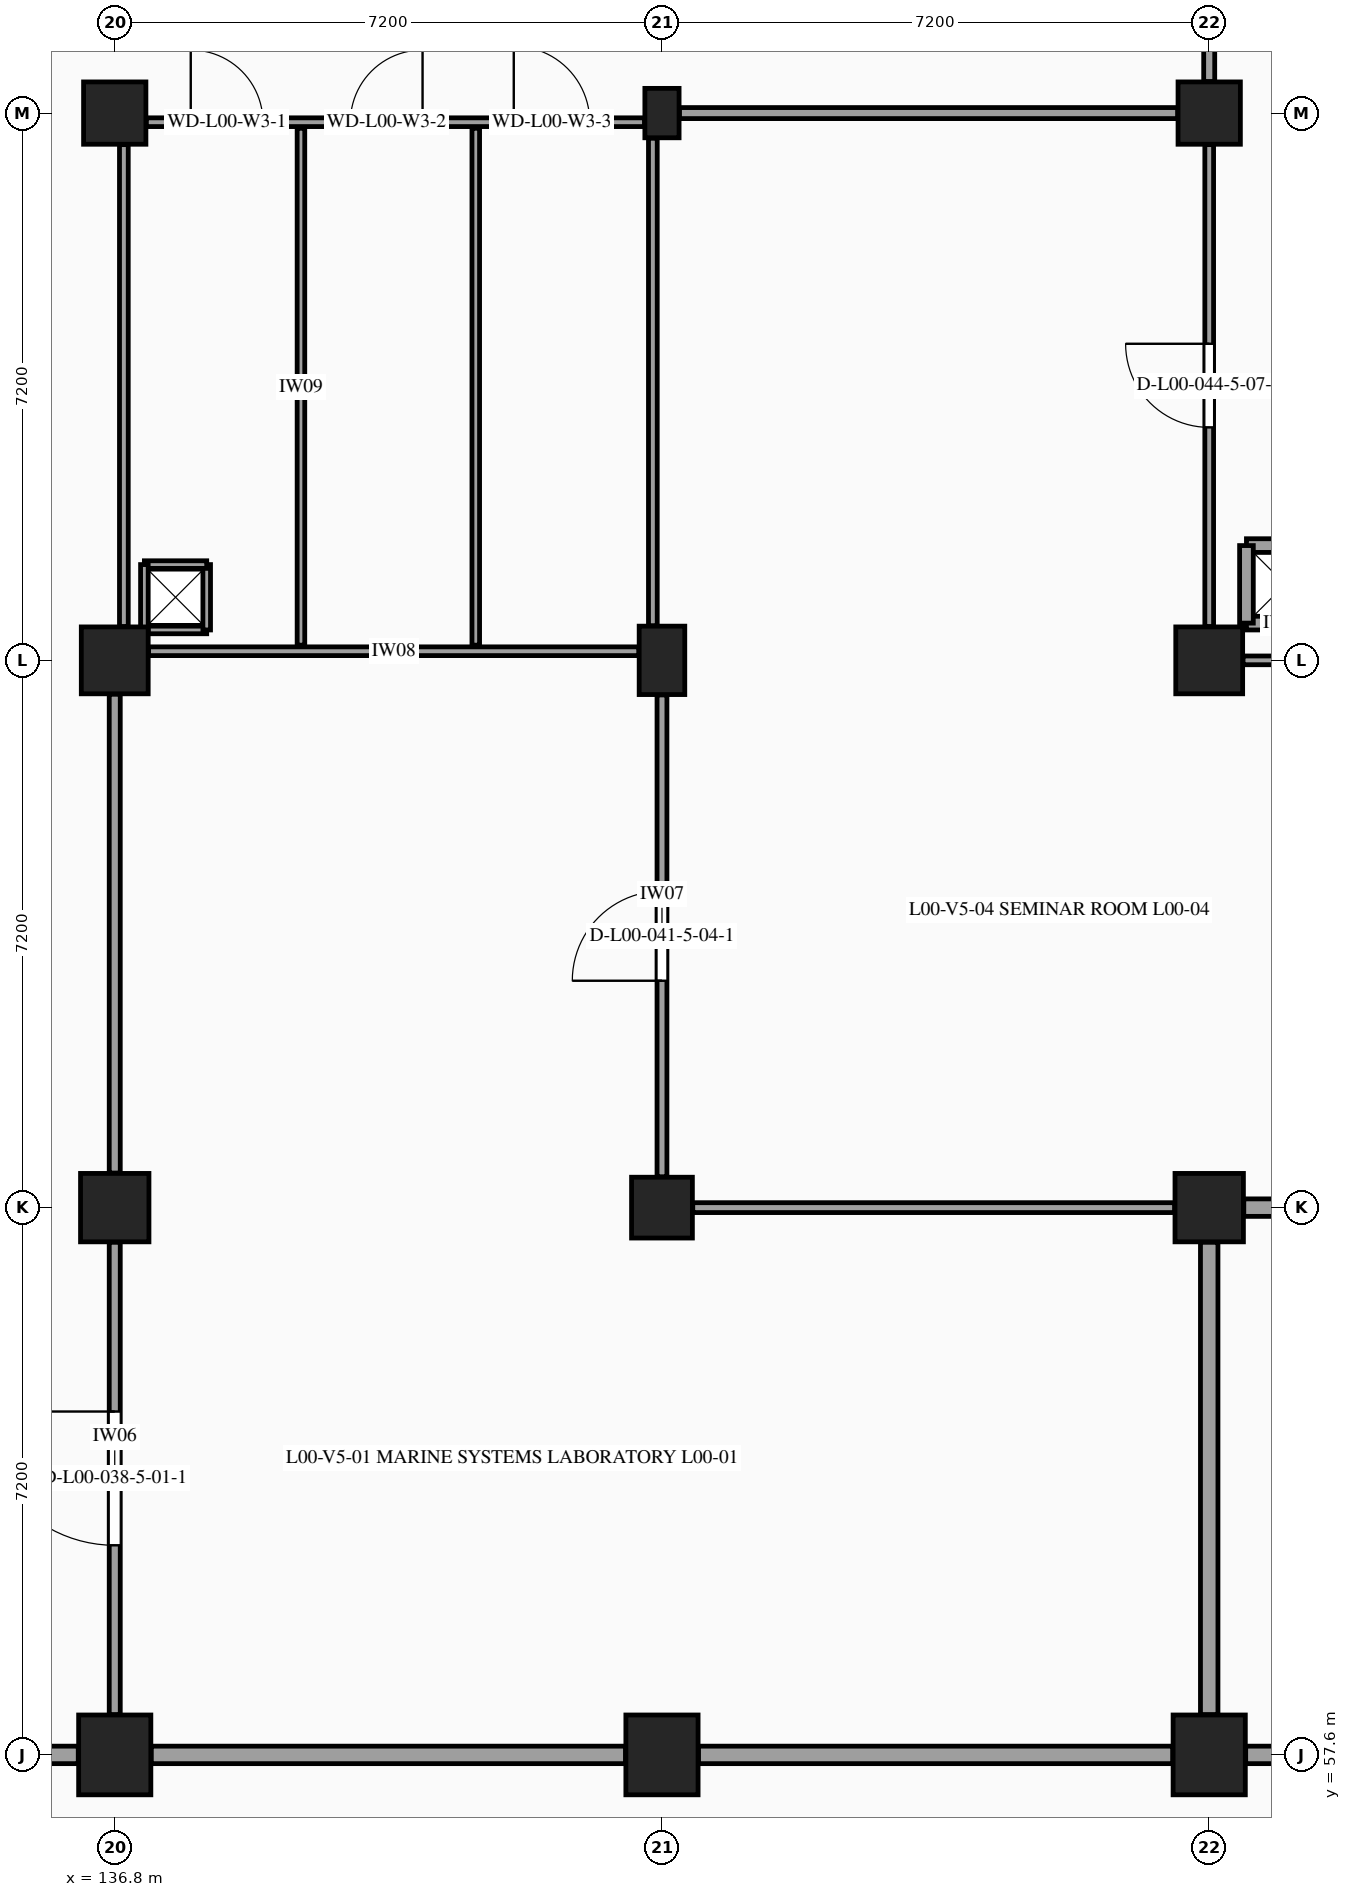
"""IFC4 building model, lengths in metres.
Left out: names, types, materials, properties, quantities, classifications, styles, units other than length and angle.
Written with IfcOpenShell. Run it as: python <this file> out.ifc"""

import sys

from ifc_helpers import new_model, si_unit, direction, frame, frame_2d, origin, origin_2d, place, context, subcontext, project, spatial, rectangle, extrude, element, fill, save


model = new_model("IFC4")
c1 = context("Model", 3, precision=1e-05, world=origin(), true_north=direction((0.0, 1.0)))
c2 = subcontext(c1, "Body", "Model", "MODEL_VIEW")
j1 = project(units=[si_unit("LENGTHUNIT", "METRE"), si_unit("PLANEANGLEUNIT", "RADIAN")], contexts=[c1])
p1 = place(None, origin())
s1 = spatial("IfcSite", under=j1, at=p1, CompositionType="ELEMENT")
p2 = place(p1, origin())
s2 = spatial("IfcBuilding", under=s1, at=p2, CompositionType="ELEMENT")
p3 = place(p2, origin())
s3 = spatial("IfcBuildingStorey", under=s2, at=p3, CompositionType="ELEMENT", Elevation=0.0)
p4 = place(p3, frame((136.8, 57.6, 0.0), z_axis=(0.0, 0.0, 1.0), x_axis=(1.0, 0.0, 0.0)))
e1 = element("IfcColumn", 1, at=p4, inside=s3, PredefinedType="COLUMN", context=c2, shape_type="SweptSolid", body=[
    extrude(rectangle(XDim=0.95, YDim=1.05, at=origin_2d()), origin(), (0.0, 0.0, 1.0), 5.4),
])
p5 = place(p3, frame((136.8, 64.8, 0.0), z_axis=(0.0, 0.0, 1.0), x_axis=(1.0, 0.0, 0.0)))
e2 = element("IfcColumn", 2, at=p5, inside=s3, PredefinedType="COLUMN", context=c2, shape_type="SweptSolid", body=[
    extrude(rectangle(XDim=0.9, YDim=0.9, at=origin_2d()), origin(), (0.0, 0.0, 1.0), 5.4),
])
p6 = place(p3, frame((136.8, 72.0, 0.0), z_axis=(0.0, 0.0, 1.0), x_axis=(1.0, 0.0, 0.0)))
e3 = element("IfcColumn", 3, at=p6, inside=s3, PredefinedType="COLUMN", context=c2, shape_type="SweptSolid", body=[
    extrude(rectangle(XDim=0.88, YDim=0.88, at=origin_2d()), origin(), (0.0, 0.0, 1.0), 5.4),
])
p7 = place(p3, frame((136.8, 79.2, 0.0), z_axis=(0.0, 0.0, 1.0), x_axis=(1.0, 0.0, 0.0)))
e4 = element("IfcColumn", 4, at=p7, inside=s3, PredefinedType="COLUMN", context=c2, shape_type="SweptSolid", body=[
    extrude(rectangle(XDim=0.82, YDim=0.82, at=origin_2d()), origin(), (0.0, 0.0, 1.0), 5.4),
])
p8 = place(p3, frame((144.0, 57.6, 0.0), z_axis=(0.0, 0.0, 1.0), x_axis=(1.0, 0.0, 0.0)))
e5 = element("IfcColumn", 5, at=p8, inside=s3, PredefinedType="COLUMN", context=c2, shape_type="SweptSolid", body=[
    extrude(rectangle(XDim=0.95, YDim=1.05, at=origin_2d()), origin(), (0.0, 0.0, 1.0), 5.4),
])
p9 = place(p3, frame((144.0, 64.8, 0.0), z_axis=(0.0, 0.0, 1.0), x_axis=(1.0, 0.0, 0.0)))
e6 = element("IfcColumn", 6, at=p9, inside=s3, PredefinedType="COLUMN", context=c2, shape_type="SweptSolid", body=[
    extrude(rectangle(XDim=0.8, YDim=0.8, at=origin_2d()), origin(), (0.0, 0.0, 1.0), 5.4),
])
p10 = place(p3, frame((144.0, 72.0, 0.0), z_axis=(0.0, 0.0, 1.0), x_axis=(1.0, 0.0, 0.0)))
e7 = element("IfcColumn", 7, at=p10, inside=s3, PredefinedType="COLUMN", context=c2, shape_type="SweptSolid", body=[
    extrude(rectangle(XDim=0.6, YDim=0.9, at=origin_2d()), origin(), (0.0, 0.0, 1.0), 5.4),
])
p11 = place(p3, frame((144.0, 79.2, 0.0), z_axis=(0.0, 0.0, 1.0), x_axis=(1.0, 0.0, 0.0)))
e8 = element("IfcColumn", 8, at=p11, inside=s3, PredefinedType="PILASTER", context=c2, shape_type="SweptSolid", body=[
    extrude(rectangle(XDim=0.45, YDim=0.65, at=origin_2d()), origin(), (0.0, 0.0, 1.0), 5.4),
])
p12 = place(p3, frame((151.2, 57.6, 0.0), z_axis=(0.0, 0.0, 1.0), x_axis=(1.0, 0.0, 0.0)))
e9 = element("IfcColumn", 9, at=p12, inside=s3, PredefinedType="COLUMN", context=c2, shape_type="SweptSolid", body=[
    extrude(rectangle(XDim=0.95, YDim=1.05, at=origin_2d()), origin(), (0.0, 0.0, 1.0), 5.4),
])
p13 = place(p3, frame((151.2, 64.8, 0.0), z_axis=(0.0, 0.0, 1.0), x_axis=(1.0, 0.0, 0.0)))
e10 = element("IfcColumn", 10, at=p13, inside=s3, PredefinedType="COLUMN", context=c2, shape_type="SweptSolid", body=[
    extrude(rectangle(XDim=0.9, YDim=0.9, at=origin_2d()), origin(), (0.0, 0.0, 1.0), 5.4),
])
p14 = place(p3, frame((151.2, 72.0, 0.0), z_axis=(0.0, 0.0, 1.0), x_axis=(1.0, 0.0, 0.0)))
e11 = element("IfcColumn", 11, at=p14, inside=s3, PredefinedType="COLUMN", context=c2, shape_type="SweptSolid", body=[
    extrude(rectangle(XDim=0.88, YDim=0.88, at=origin_2d()), origin(), (0.0, 0.0, 1.0), 5.4),
])
p15 = place(p3, frame((151.2, 79.2, 0.0), z_axis=(0.0, 0.0, 1.0), x_axis=(1.0, 0.0, 0.0)))
e12 = element("IfcColumn", 12, at=p15, inside=s3, PredefinedType="COLUMN", context=c2, shape_type="SweptSolid", body=[
    extrude(rectangle(XDim=0.82, YDim=0.82, at=origin_2d()), origin(), (0.0, 0.0, 1.0), 5.4),
])
p16 = place(p3, frame((137.245, 72.12, 0.0), z_axis=(0.0, 0.0, 1.0), x_axis=(1.0, 0.0, 0.0)))
e13 = element("IfcWall", 13, at=p16, inside=s3, PredefinedType="PARTITIONING", context=c2, shape_type="SweptSolid", body=[
    extrude(rectangle(XDim=6.45, YDim=0.115, at=frame_2d((3.225, 0.0))), origin(), (0.0, 0.0, 1.0), 4.29),
])
p17 = place(p3, frame((137.215, 79.08, 0.0), z_axis=(0.0, 0.0, 1.0), x_axis=(1.0, 0.0, 0.0)))
e14 = element("IfcWall", 14, at=p17, inside=s3, PredefinedType="PARTITIONING", context=c2, shape_type="SweptSolid", body=[
    extrude(rectangle(XDim=6.555, YDim=0.115, at=frame_2d((3.277, 0.0))), origin(), (0.0, 0.0, 1.0), 4.29),
])
p18 = place(p17, frame((0.585, 0.0, 0.0)))
e15 = element("IfcOpeningElement", 15, at=p18, cuts=e14, PredefinedType="OPENING", context=c2, shape_type="SweptSolid", body=[
    extrude(rectangle(XDim=0.95, YDim=2.1, at=frame_2d((0.475, 1.05))), frame((0.0, 0.067, 0.0), z_axis=(0.0, -1.0, 0.0), x_axis=(1.0, 0.0, 0.0)), (0.0, 0.0, 1.0), 0.135),
])
p19 = place(p17, frame((2.685, 0.0, 0.0)))
e16 = element("IfcOpeningElement", 16, at=p19, cuts=e14, PredefinedType="OPENING", context=c2, shape_type="SweptSolid", body=[
    extrude(rectangle(XDim=0.95, YDim=2.1, at=frame_2d((0.475, 1.05))), frame((0.0, 0.067, 0.0), z_axis=(0.0, -1.0, 0.0), x_axis=(1.0, 0.0, 0.0)), (0.0, 0.0, 1.0), 0.135),
])
p20 = place(p17, frame((4.835, 0.0, 0.0)))
e17 = element("IfcOpeningElement", 17, at=p20, cuts=e14, PredefinedType="OPENING", context=c2, shape_type="SweptSolid", body=[
    extrude(rectangle(XDim=1.0, YDim=2.15, at=frame_2d((0.5, 1.075))), frame((0.0, 0.067, 0.0), z_axis=(0.0, -1.0, 0.0), x_axis=(1.0, 0.0, 0.0)), (0.0, 0.0, 1.0), 0.135),
])
p21 = place(p3, frame((136.92, 72.445, 0.0), z_axis=(0.0, 0.0, 1.0), x_axis=(0.0, 1.0, 0.0)))
e18 = element("IfcWall", 18, at=p21, inside=s3, PredefinedType="PARTITIONING", context=c2, shape_type="SweptSolid", body=[
    extrude(rectangle(XDim=6.34, YDim=0.115, at=frame_2d((3.17, 0.0))), origin(), (0.0, 0.0, 1.0), 4.4),
])
p22 = place(p3, frame((143.88, 72.455, 0.0), z_axis=(0.0, 0.0, 1.0), x_axis=(0.0, 1.0, 0.0)))
e19 = element("IfcWall", 19, at=p22, inside=s3, PredefinedType="PARTITIONING", context=c2, shape_type="SweptSolid", body=[
    extrude(rectangle(XDim=6.415, YDim=0.115, at=frame_2d((3.208, 0.0))), origin(), (0.0, 0.0, 1.0), 4.4),
])
for number, where, z_axis, x_axis in (
    (20, (139.25, 72.2, 0.0), (0.0, 0.0, 1.0), (0.0, 1.0, 0.0)),
    (21, (141.55, 72.2, 0.0), (0.0, 0.0, 1.0), (0.0, 1.0, 0.0)),
):
    element("IfcWall", number, at=place(p3, frame(where, z_axis=z_axis, x_axis=x_axis)), inside=s3, PredefinedType="PARTITIONING", context=c2, shape_type="SweptSolid", body=[
        extrude(rectangle(XDim=6.8, YDim=0.1, at=frame_2d((3.4, 0.0))), origin(), (0.0, 0.0, 1.0), 5.09),
    ])
for number, where, z_axis, x_axis in (
    (22, (151.69, 72.49, 0.0), (0.0, 0.0, 1.0), (1.0, 0.0, 0.0)),
    (23, (152.71, 73.51, 0.0), (0.0, 0.0, 1.0), (-1.0, 0.0, 0.0)),
    (24, (151.69, 73.51, 0.0), (0.0, 0.0, 1.0), (0.0, -1.0, 0.0)),
):
    element("IfcWall", number, at=place(p3, frame(where, z_axis=z_axis, x_axis=x_axis)), inside=s3, PredefinedType="PARTITIONING", context=c2, shape_type="SweptSolid", body=[
        extrude(rectangle(XDim=1.02, YDim=0.18, at=frame_2d((0.51, 0.0))), origin(), (0.0, 0.0, 1.0), 5.09),
    ])
p23 = place(p3, frame((137.19, 72.4, 0.0), z_axis=(0.0, 0.0, 1.0), x_axis=(1.0, 0.0, 0.0)))
e25 = element("IfcWall", 25, at=p23, inside=s3, PredefinedType="PARTITIONING", context=c2, shape_type="SweptSolid", body=[
    extrude(rectangle(XDim=0.82, YDim=0.1, at=frame_2d((0.41, 0.0))), origin(), (0.0, 0.0, 1.0), 5.09),
])
p24 = place(p3, frame((138.01, 72.4, 0.0), z_axis=(0.0, 0.0, 1.0), x_axis=(0.0, 1.0, 0.0)))
e26 = element("IfcWall", 26, at=p24, inside=s3, PredefinedType="PARTITIONING", context=c2, shape_type="SweptSolid", body=[
    extrude(rectangle(XDim=0.86, YDim=0.1, at=frame_2d((0.43, 0.0))), origin(), (0.0, 0.0, 1.0), 5.09),
])
p25 = place(p3, frame((138.01, 73.26, 0.0), z_axis=(0.0, 0.0, 1.0), x_axis=(-1.0, 0.0, 0.0)))
e27 = element("IfcWall", 27, at=p25, inside=s3, PredefinedType="PARTITIONING", context=c2, shape_type="SweptSolid", body=[
    extrude(rectangle(XDim=0.82, YDim=0.1, at=frame_2d((0.41, 0.0))), origin(), (0.0, 0.0, 1.0), 5.09),
])
p26 = place(p3, frame((137.19, 73.26, 0.0), z_axis=(0.0, 0.0, 1.0), x_axis=(0.0, -1.0, 0.0)))
e28 = element("IfcWall", 28, at=p26, inside=s3, PredefinedType="PARTITIONING", context=c2, shape_type="SweptSolid", body=[
    extrude(rectangle(XDim=0.86, YDim=0.1, at=frame_2d((0.43, 0.0))), origin(), (0.0, 0.0, 1.0), 5.09),
])
p27 = place(p3, frame((130.08, 57.6, 0.0), z_axis=(0.0, 0.0, 1.0), x_axis=(1.0, 0.0, 0.0)))
e29 = element("IfcWall", 29, at=p27, inside=s3, PredefinedType="PARTITIONING", context=c2, shape_type="SweptSolid", body=[
    extrude(rectangle(XDim=6.24, YDim=0.23, at=frame_2d((3.12, 0.0))), origin(), (0.0, 0.0, 1.0), 4.45),
])
p28 = place(p27, frame((2.32, 0.0, 0.0)))
e30 = element("IfcOpeningElement", 30, at=p28, cuts=e29, PredefinedType="OPENING", context=c2, shape_type="SweptSolid", body=[
    extrude(rectangle(XDim=1.6, YDim=2.2, at=frame_2d((0.8, 1.1))), frame((0.0, 0.125, 0.0), z_axis=(0.0, -1.0, 0.0), x_axis=(1.0, 0.0, 0.0)), (0.0, 0.0, 1.0), 0.25),
])
p29 = place(p3, frame((136.8, 58.13, 0.0), z_axis=(0.0, 0.0, 1.0), x_axis=(0.0, 1.0, 0.0)))
e31 = element("IfcWall", 31, at=p29, inside=s3, PredefinedType="PARTITIONING", context=c2, shape_type="SweptSolid", body=[
    extrude(rectangle(XDim=6.215, YDim=0.145, at=frame_2d((3.107, 0.0))), origin(), (0.0, 0.0, 1.0), 4.405),
])
p30 = place(p29, frame((2.228, 0.0, 0.0)))
e32 = element("IfcOpeningElement", 32, at=p30, cuts=e31, PredefinedType="OPENING", context=c2, shape_type="SweptSolid", body=[
    extrude(rectangle(XDim=1.76, YDim=2.3, at=frame_2d((0.88, 1.15))), frame((0.0, 0.083, 0.0), z_axis=(0.0, -1.0, 0.0), x_axis=(1.0, 0.0, 0.0)), (0.0, 0.0, 1.0), 0.165),
])
p31 = place(p3, frame((136.8, 65.255, 0.0), z_axis=(0.0, 0.0, 1.0), x_axis=(0.0, 1.0, 0.0)))
e33 = element("IfcWall", 33, at=p31, inside=s3, PredefinedType="PARTITIONING", context=c2, shape_type="SweptSolid", body=[
    extrude(rectangle(XDim=6.3, YDim=0.145, at=frame_2d((3.15, 0.0))), origin(), (0.0, 0.0, 1.0), 4.405),
])
p32 = place(p3, frame((137.28, 57.6, 0.0), z_axis=(0.0, 0.0, 1.0), x_axis=(1.0, 0.0, 0.0)))
e34 = element("IfcWall", 34, at=p32, inside=s3, PredefinedType="PARTITIONING", context=c2, shape_type="SweptSolid", body=[
    extrude(rectangle(XDim=6.24, YDim=0.23, at=frame_2d((3.12, 0.0))), origin(), (0.0, 0.0, 1.0), 4.29),
])
p33 = place(p3, frame((144.0, 65.205, 0.0), z_axis=(0.0, 0.0, 1.0), x_axis=(0.0, 1.0, 0.0)))
e35 = element("IfcWall", 35, at=p33, inside=s3, PredefinedType="PARTITIONING", context=c2, shape_type="SweptSolid", body=[
    extrude(rectangle(XDim=6.34, YDim=0.13, at=frame_2d((3.17, 0.0))), origin(), (0.0, 0.0, 1.0), 4.405),
])
p34 = place(p33, frame((2.58, 0.0, 0.0)))
e36 = element("IfcOpeningElement", 36, at=p34, cuts=e35, PredefinedType="OPENING", context=c2, shape_type="SweptSolid", body=[
    extrude(rectangle(XDim=1.18, YDim=2.18, at=frame_2d((0.59, 1.09))), frame((0.0, 0.075, 0.0), z_axis=(0.0, -1.0, 0.0), x_axis=(1.0, 0.0, 0.0)), (0.0, 0.0, 1.0), 0.15),
])
p35 = place(p3, frame((144.48, 57.6, 0.0), z_axis=(0.0, 0.0, 1.0), x_axis=(1.0, 0.0, 0.0)))
e37 = element("IfcWall", 37, at=p35, inside=s3, PredefinedType="PARTITIONING", context=c2, shape_type="SweptSolid", body=[
    extrude(rectangle(XDim=6.24, YDim=0.23, at=frame_2d((3.12, 0.0))), origin(), (0.0, 0.0, 1.0), 4.31),
])
p36 = place(p3, frame((151.2, 58.13, 0.0), z_axis=(0.0, 0.0, 1.0), x_axis=(0.0, 1.0, 0.0)))
e38 = element("IfcWall", 38, at=p36, inside=s3, PredefinedType="PARTITIONING", context=c2, shape_type="SweptSolid", body=[
    extrude(rectangle(XDim=6.215, YDim=0.23, at=frame_2d((3.107, 0.0))), origin(), (0.0, 0.0, 1.0), 4.405),
])
p37 = place(p3, frame((144.405, 64.8, 0.0), z_axis=(0.0, 0.0, 1.0), x_axis=(1.0, 0.0, 0.0)))
e39 = element("IfcWall", 39, at=p37, inside=s3, PredefinedType="PARTITIONING", context=c2, shape_type="SweptSolid", body=[
    extrude(rectangle(XDim=6.34, YDim=0.13, at=frame_2d((3.17, 0.0))), origin(), (0.0, 0.0, 1.0), 4.31),
])
p38 = place(p3, frame((151.2, 72.445, 0.0), z_axis=(0.0, 0.0, 1.0), x_axis=(0.0, 1.0, 0.0)))
e40 = element("IfcWall", 40, at=p38, inside=s3, PredefinedType="PARTITIONING", context=c2, shape_type="SweptSolid", body=[
    extrude(rectangle(XDim=6.34, YDim=0.115, at=frame_2d((3.17, 0.0))), origin(), (0.0, 0.0, 1.0), 4.4),
])
p39 = place(p38, frame((2.62, 0.0, 0.0)))
e41 = element("IfcOpeningElement", 41, at=p39, cuts=e40, PredefinedType="OPENING", context=c2, shape_type="SweptSolid", body=[
    extrude(rectangle(XDim=1.1, YDim=2.15, at=frame_2d((0.55, 1.075))), frame((0.0, 0.067, 0.0), z_axis=(0.0, -1.0, 0.0), x_axis=(1.0, 0.0, 0.0)), (0.0, 0.0, 1.0), 0.135),
])
p40 = place(p3, frame((144.23, 79.2, 0.0), z_axis=(0.0, 0.0, 1.0), x_axis=(1.0, 0.0, 0.0)))
e42 = element("IfcWall", 42, at=p40, inside=s3, PredefinedType="PARTITIONING", context=c2, shape_type="SweptSolid", body=[
    extrude(rectangle(XDim=6.555, YDim=0.145, at=frame_2d((3.277, 0.0))), origin(), (0.0, 0.0, 1.0), 4.31),
])
p41 = place(p3, frame((151.2, 79.615, 0.0), z_axis=(0.0, 0.0, 1.0), x_axis=(0.0, 1.0, 0.0)))
e43 = element("IfcWall", 43, at=p41, inside=s3, PredefinedType="PARTITIONING", context=c2, shape_type="SweptSolid", body=[
    extrude(rectangle(XDim=6.38, YDim=0.145, at=frame_2d((3.19, 0.0))), origin(), (0.0, 0.0, 1.0), 4.395),
])
p42 = place(p3, frame((151.68, 57.6, 0.0), z_axis=(0.0, 0.0, 1.0), x_axis=(1.0, 0.0, 0.0)))
e44 = element("IfcWall", 44, at=p42, inside=s3, PredefinedType="PARTITIONING", context=c2, shape_type="SweptSolid", body=[
    extrude(rectangle(XDim=6.24, YDim=0.23, at=frame_2d((3.12, 0.0))), origin(), (0.0, 0.0, 1.0), 4.34),
])
p43 = place(p42, frame((2.445, 0.0, 0.0)))
e45 = element("IfcOpeningElement", 45, at=p43, cuts=e44, PredefinedType="OPENING", context=c2, shape_type="SweptSolid", body=[
    extrude(rectangle(XDim=1.35, YDim=2.15, at=frame_2d((0.675, 1.075))), frame((0.0, 0.125, 0.0), z_axis=(0.0, -1.0, 0.0), x_axis=(1.0, 0.0, 0.0)), (0.0, 0.0, 1.0), 0.25),
])
p44 = place(p3, frame((151.655, 64.8, 0.0), z_axis=(0.0, 0.0, 1.0), x_axis=(1.0, 0.0, 0.0)))
e46 = element("IfcWall", 46, at=p44, inside=s3, PredefinedType="PARTITIONING", context=c2, shape_type="SweptSolid", body=[
    extrude(rectangle(XDim=6.34, YDim=0.23, at=frame_2d((3.17, 0.0))), origin(), (0.0, 0.0, 1.0), 4.34),
])
p45 = place(p3, frame((151.645, 72.0, 0.0), z_axis=(0.0, 0.0, 1.0), x_axis=(1.0, 0.0, 0.0)))
e47 = element("IfcWall", 47, at=p45, inside=s3, PredefinedType="PARTITIONING", context=c2, shape_type="SweptSolid", body=[
    extrude(rectangle(XDim=6.45, YDim=0.115, at=frame_2d((3.225, 0.0))), origin(), (0.0, 0.0, 1.0), 4.34),
])
p46 = place(p18, origin())
e48 = element("IfcDoor", 48, at=p46, inside=s3, OperationType="SINGLE_SWING_LEFT", PredefinedType="DOOR", context=c2, shape_type="SweptSolid", body=[
    extrude(rectangle(XDim=0.95, YDim=2.1, at=frame_2d((0.475, 1.05))), frame((0.0, 0.025, 0.0), z_axis=(0.0, -1.0, 0.0), x_axis=(1.0, 0.0, 0.0)), (0.0, 0.0, 1.0), 0.05),
])
fill(e15, e48)
p47 = place(p19, origin())
e49 = element("IfcDoor", 49, at=p47, inside=s3, OperationType="SINGLE_SWING_RIGHT", PredefinedType="DOOR", context=c2, shape_type="SweptSolid", body=[
    extrude(rectangle(XDim=0.95, YDim=2.1, at=frame_2d((0.475, 1.05))), frame((0.0, 0.025, 0.0), z_axis=(0.0, -1.0, 0.0), x_axis=(1.0, 0.0, 0.0)), (0.0, 0.0, 1.0), 0.05),
])
fill(e16, e49)
p48 = place(p20, origin())
e50 = element("IfcDoor", 50, at=p48, inside=s3, OperationType="SINGLE_SWING_LEFT", PredefinedType="DOOR", context=c2, shape_type="SweptSolid", body=[
    extrude(rectangle(XDim=1.0, YDim=2.15, at=frame_2d((0.5, 1.075))), frame((0.0, 0.025, 0.0), z_axis=(0.0, -1.0, 0.0), x_axis=(1.0, 0.0, 0.0)), (0.0, 0.0, 1.0), 0.05),
])
fill(e17, e50)
p49 = place(p30, origin())
e51 = element("IfcDoor", 51, at=p49, inside=s3, OperationType="SINGLE_SWING_RIGHT", PredefinedType="DOOR", context=c2, shape_type="SweptSolid", body=[
    extrude(rectangle(XDim=1.76, YDim=2.3, at=frame_2d((0.88, 1.15))), frame((0.0, 0.025, 0.0), z_axis=(0.0, -1.0, 0.0), x_axis=(1.0, 0.0, 0.0)), (0.0, 0.0, 1.0), 0.05),
])
fill(e32, e51)
p50 = place(p34, origin())
e52 = element("IfcDoor", 52, at=p50, inside=s3, OperationType="SINGLE_SWING_LEFT", PredefinedType="DOOR", context=c2, shape_type="SweptSolid", body=[
    extrude(rectangle(XDim=1.18, YDim=2.18, at=frame_2d((0.59, 1.09))), frame((0.0, 0.025, 0.0), z_axis=(0.0, -1.0, 0.0), x_axis=(1.0, 0.0, 0.0)), (0.0, 0.0, 1.0), 0.05),
])
fill(e36, e52)
p51 = place(p39, origin())
e53 = element("IfcDoor", 53, at=p51, inside=s3, OperationType="SINGLE_SWING_RIGHT", PredefinedType="DOOR", context=c2, shape_type="SweptSolid", body=[
    extrude(rectangle(XDim=1.1, YDim=2.15, at=frame_2d((0.55, 1.075))), frame((0.0, 0.025, 0.0), z_axis=(0.0, -1.0, 0.0), x_axis=(1.0, 0.0, 0.0)), (0.0, 0.0, 1.0), 0.05),
])
fill(e41, e53)
save(model, sys.argv[1])
